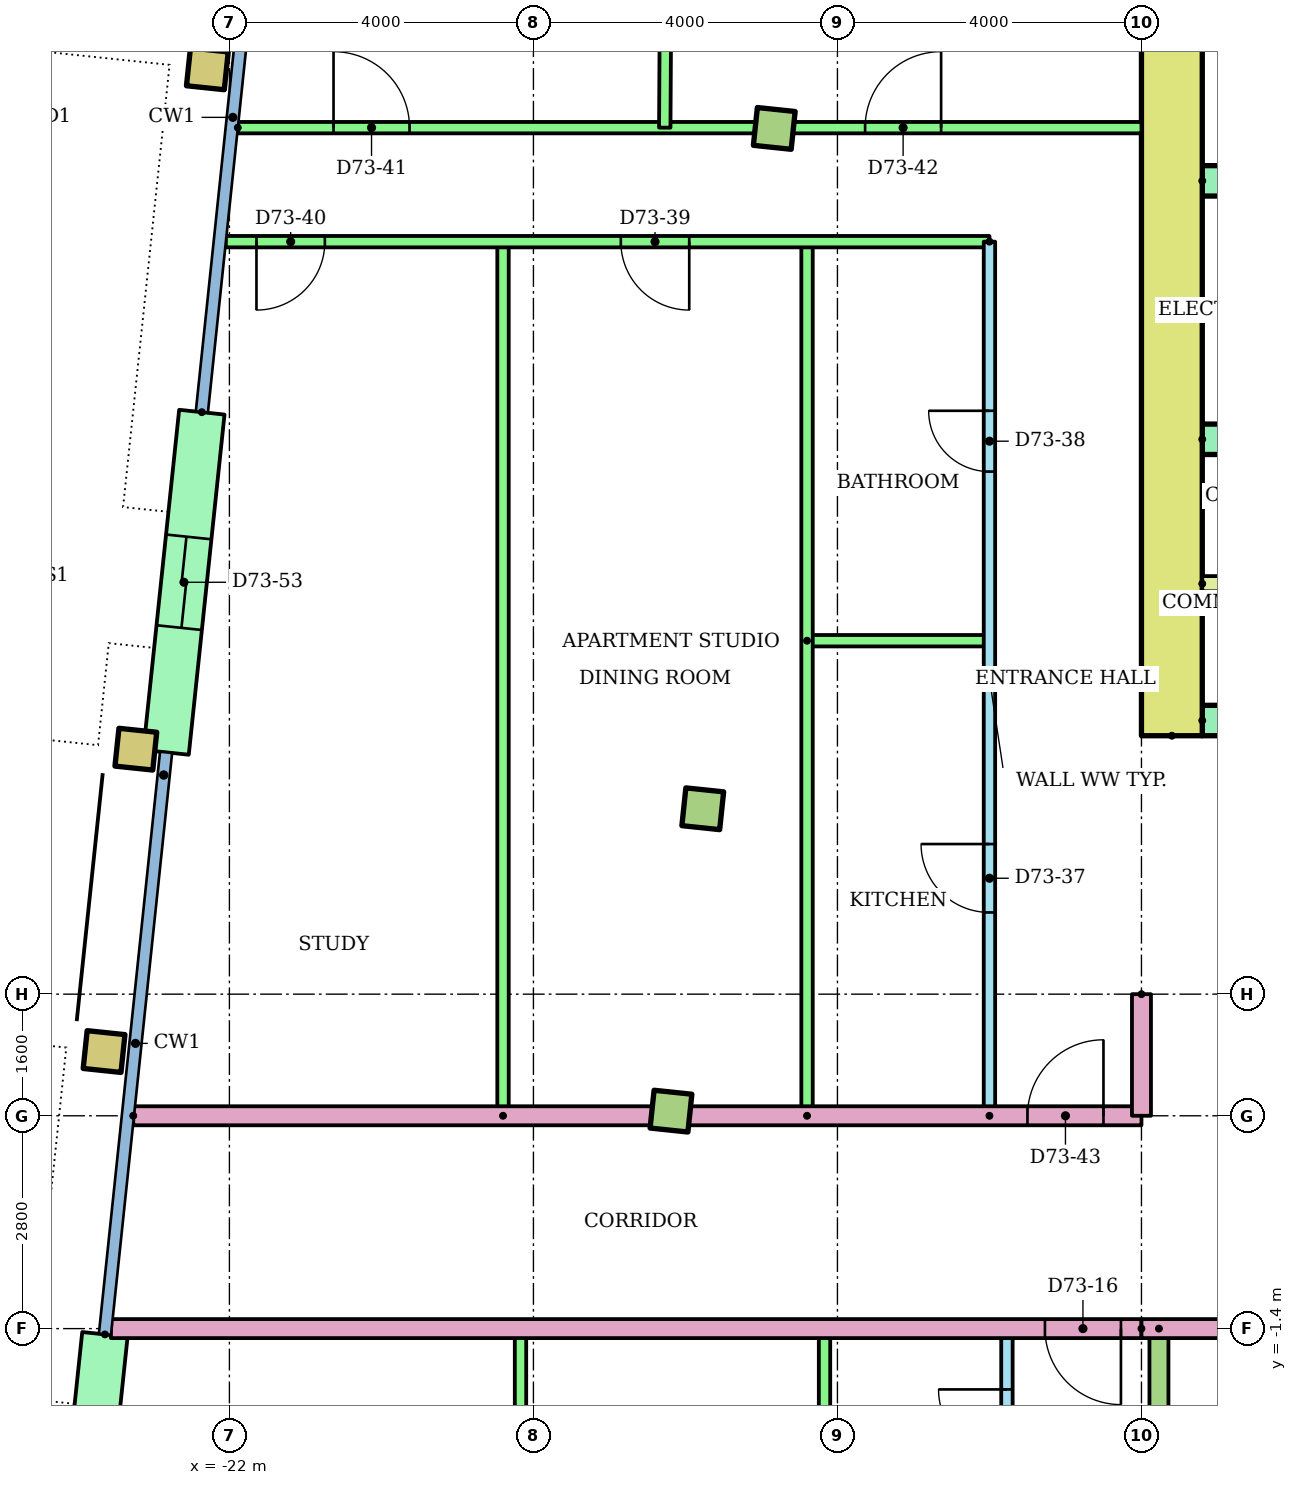
"""IFC4 building model, lengths in metres.
Left out: names, types, materials, properties, quantities, classifications, styles, units other than length and angle.
Written with IfcOpenShell. Run it as: python <this file> out.ifc"""

import sys

from ifc_helpers import new_model, si_unit, direction, frame, frame_2d, origin, origin_2d, place, context, subcontext, project, spatial, rectangle, hollow_rectangle, extrude, element, fill, save


model = new_model("IFC4")
c1 = context("Model", 3, precision=1e-05, world=origin(), true_north=direction((0.0, 1.0)))
c2 = subcontext(c1, "Body", "Model", "MODEL_VIEW")
j1 = project(units=[si_unit("LENGTHUNIT", "METRE"), si_unit("PLANEANGLEUNIT", "RADIAN")], contexts=[c1])
p1 = place(None, origin())
s1 = spatial("IfcSite", under=j1, at=p1, CompositionType="ELEMENT")
p2 = place(p1, origin())
s2 = spatial("IfcBuilding", under=s1, at=p2, CompositionType="ELEMENT")
p3 = place(p2, frame((0.0, 0.0, 278.7)))
s3 = spatial("IfcBuildingStorey", under=s2, at=p3, CompositionType="ELEMENT", Elevation=278.7)
p4 = place(p3, frame((-23.649, 2.245, 0.0), z_axis=(0.0, 0.0, 1.0), x_axis=(0.994521895368, -0.104528463268, 0.0)))
e1 = element("IfcColumn", 1, at=p4, inside=s3, PredefinedType="COLUMN", context=c2, shape_type="SweptSolid", body=[
    extrude(hollow_rectangle(XDim=0.5, YDim=0.5, WallThickness=0.025, at=origin_2d()), origin(), (0.0, 0.0, 1.0), 3.2),
])
p5 = place(p3, frame((-16.19, 1.461, 0.0), z_axis=(0.0, 0.0, 1.0), x_axis=(0.994521895368, -0.104528463268, 0.0)))
e2 = element("IfcColumn", 2, at=p5, inside=s3, PredefinedType="COLUMN", context=c2, shape_type="SweptSolid", body=[
    extrude(rectangle(XDim=0.5, YDim=0.5, at=origin_2d()), origin(), (0.0, 0.0, 1.0), 3.2),
])
p6 = place(p3, frame((-23.231, 6.223, 0.0), z_axis=(0.0, 0.0, 1.0), x_axis=(0.994521895368, -0.104528463268, 0.0)))
e3 = element("IfcColumn", 3, at=p6, inside=s3, PredefinedType="COLUMN", context=c2, shape_type="SweptSolid", body=[
    extrude(hollow_rectangle(XDim=0.5, YDim=0.5, WallThickness=0.025, at=origin_2d()), origin(), (0.0, 0.0, 1.0), 3.2),
])
p7 = place(p3, frame((-15.772, 5.439, 0.0), z_axis=(0.0, 0.0, 1.0), x_axis=(0.994521895368, -0.104528463268, 0.0)))
e4 = element("IfcColumn", 4, at=p7, inside=s3, PredefinedType="COLUMN", context=c2, shape_type="SweptSolid", body=[
    extrude(rectangle(XDim=0.5, YDim=0.5, at=origin_2d()), origin(), (0.0, 0.0, 1.0), 3.2),
])
p8 = place(p3, frame((-22.29, 15.174, 0.0), z_axis=(0.0, 0.0, 1.0), x_axis=(0.994521895368, -0.104528463268, 0.0)))
e5 = element("IfcColumn", 5, at=p8, inside=s3, PredefinedType="COLUMN", context=c2, shape_type="SweptSolid", body=[
    extrude(hollow_rectangle(XDim=0.5, YDim=0.5, WallThickness=0.025, at=origin_2d()), origin(), (0.0, 0.0, 1.0), 3.2),
])
p9 = place(p3, frame((-14.831, 14.39, 0.0), z_axis=(0.0, 0.0, 1.0), x_axis=(0.994521895368, -0.104528463268, 0.0)))
e6 = element("IfcColumn", 6, at=p9, inside=s3, PredefinedType="COLUMN", context=c2, shape_type="SweptSolid", body=[
    extrude(rectangle(XDim=0.5, YDim=0.5, at=origin_2d()), origin(), (0.0, 0.0, 1.0), 3.2),
])
p10 = place(p3, frame((-22.363, 10.657, 0.0), z_axis=(0.0, 0.0, 1.0), x_axis=(-0.104492739125, -0.994525649478, 0.0)))
e7 = element("IfcWall", 7, at=p10, inside=s3, PredefinedType="STANDARD", context=c2, shape_type="SweptSolid", body=[
    extrude(rectangle(XDim=4.5, YDim=0.6, at=frame_2d((2.25, 0.0))), origin(), (0.0, 0.0, 1.0), 2.8),
])
p11 = place(p10, frame((1.65, 0.0, 0.0)))
e8 = element("IfcOpeningElement", 8, at=p11, cuts=e7, PredefinedType="OPENING", context=c2, shape_type="SweptSolid", body=[
    extrude(rectangle(XDim=1.2, YDim=2.1, at=frame_2d((0.6, 1.05))), frame((0.0, 0.31, 0.0), z_axis=(0.0, -1.0, 0.0), x_axis=(1.0, 0.0, 0.0)), (0.0, 0.0, 1.0), 0.62),
])
p12 = place(p3, frame((-23.638, -1.476, 0.0), z_axis=(0.0, 0.0, 1.0), x_axis=(-0.104513052986, -0.994523514933, 0.0)))
e9 = element("IfcWall", 9, at=p12, inside=s3, PredefinedType="STANDARD", context=c2, shape_type="SweptSolid", body=[
    extrude(rectangle(XDim=3.7, YDim=0.6, at=frame_2d((1.85, 0.0))), origin(), (0.0, 0.0, 1.0), 2.8),
])
p13 = place(p12, frame((1.25, 0.0, 0.0)))
e10 = element("IfcOpeningElement", 10, at=p13, cuts=e9, PredefinedType="OPENING", context=c2, shape_type="SweptSolid", body=[
    extrude(rectangle(XDim=1.2, YDim=2.1, at=frame_2d((0.6, 1.05))), frame((0.0, 0.31, 0.0), z_axis=(0.0, -1.0, 0.0), x_axis=(1.0, 0.0, 0.0)), (0.0, 0.0, 1.0), 0.62),
])
p14 = place(p3, frame((-9.6, 6.4, 0.0), z_axis=(0.0, 0.0, 1.0), x_axis=(0.0, 1.0, 0.0)))
e11 = element("IfcWall", 11, at=p14, inside=s3, PredefinedType="SHEAR", context=c2, shape_type="SweptSolid", body=[
    extrude(rectangle(XDim=13.6, YDim=0.8, at=frame_2d((6.8, 0.0))), origin(), (0.0, 0.0, 1.0), 2.8),
])
p15 = place(p3, frame((-9.2, 6.6, 0.0)))
e12 = element("IfcWall", 12, at=p15, inside=s3, PredefinedType="SHEAR", context=c2, shape_type="SweptSolid", body=[
    extrude(rectangle(XDim=18.4, YDim=0.4, at=frame_2d((9.2, 0.0))), origin(), (0.0, 0.0, 1.0), 2.8),
])
p16 = place(p15, frame((8.3, 0.0, 0.0)))
e13 = element("IfcOpeningElement", 13, at=p16, cuts=e12, PredefinedType="OPENING", context=c2, shape_type="SweptSolid", body=[
    extrude(rectangle(XDim=1.8, YDim=2.1, at=frame_2d((0.9, 1.05))), frame((0.0, 0.21, 0.0), z_axis=(0.0, -1.0, 0.0), x_axis=(1.0, 0.0, 0.0)), (0.0, 0.0, 1.0), 0.42),
])
p17 = place(p15, frame((3.8, 0.0, 0.0)))
e14 = element("IfcOpeningElement", 14, at=p17, cuts=e12, PredefinedType="OPENING", context=c2, shape_type="SweptSolid", body=[
    extrude(rectangle(XDim=1.8, YDim=2.1, at=frame_2d((0.9, 1.05))), frame((0.0, 0.21, 0.0), z_axis=(0.0, -1.0, 0.0), x_axis=(1.0, 0.0, 0.0)), (0.0, 0.0, 1.0), 0.42),
])
p18 = place(p15, frame((12.8, 0.0, 0.0)))
e15 = element("IfcOpeningElement", 15, at=p18, cuts=e12, PredefinedType="OPENING", context=c2, shape_type="SweptSolid", body=[
    extrude(rectangle(XDim=1.8, YDim=2.1, at=frame_2d((0.9, 1.05))), frame((0.0, 0.21, 0.0), z_axis=(0.0, -1.0, 0.0), x_axis=(1.0, 0.0, 0.0)), (0.0, 0.0, 1.0), 0.42),
])
p19 = place(p3, frame((-9.2, 10.3, 0.0)))
e16 = element("IfcWall", 16, at=p19, inside=s3, PredefinedType="SHEAR", context=c2, shape_type="SweptSolid", body=[
    extrude(rectangle(XDim=8.0, YDim=0.4, at=frame_2d((4.0, 0.0))), origin(), (0.0, 0.0, 1.0), 2.8),
])
p20 = place(p19, frame((3.35, 0.0, 0.0)))
e17 = element("IfcOpeningElement", 17, at=p20, cuts=e16, PredefinedType="OPENING", context=c2, shape_type="SweptSolid", body=[
    extrude(rectangle(XDim=1.1, YDim=2.1, at=frame_2d((0.55, 1.05))), frame((0.0, 0.21, 0.0), z_axis=(0.0, -1.0, 0.0), x_axis=(1.0, 0.0, 0.0)), (0.0, 0.0, 1.0), 0.42),
])
p21 = place(p19, frame((6.083, 0.0, 0.0)))
e18 = element("IfcOpeningElement", 18, at=p21, cuts=e16, PredefinedType="OPENING", context=c2, shape_type="SweptSolid", body=[
    extrude(rectangle(XDim=1.1, YDim=2.1, at=frame_2d((0.55, 1.05))), frame((0.0, 0.21, 0.0), z_axis=(0.0, -1.0, 0.0), x_axis=(1.0, 0.0, 0.0)), (0.0, 0.0, 1.0), 0.42),
])
p22 = place(p19, frame((0.917, 0.0, 0.0)))
e19 = element("IfcOpeningElement", 19, at=p22, cuts=e16, PredefinedType="OPENING", context=c2, shape_type="SweptSolid", body=[
    extrude(rectangle(XDim=1.0, YDim=2.1, at=frame_2d((0.5, 1.05))), frame((0.0, 0.21, 0.0), z_axis=(0.0, -1.0, 0.0), x_axis=(1.0, 0.0, 0.0)), (0.0, 0.0, 1.0), 0.42),
])
p23 = place(p3, frame((-9.2, 13.7, 0.0)))
e20 = element("IfcWall", 20, at=p23, inside=s3, PredefinedType="SHEAR", context=c2, shape_type="SweptSolid", body=[
    extrude(rectangle(XDim=8.0, YDim=0.4, at=frame_2d((4.0, 0.0))), origin(), (0.0, 0.0, 1.0), 2.8),
])
p24 = place(p3, frame((-9.2, 8.4, 0.0)))
e21 = element("IfcWall", 21, at=p24, inside=s3, PredefinedType="PARTITIONING", context=c2, shape_type="SweptSolid", body=[
    extrude(rectangle(XDim=3.4, YDim=0.2, at=frame_2d((1.7, 0.0))), origin(), (0.0, 0.0, 1.0), 2.8),
])
p25 = place(p3, frame((-11.77, -5.9, 0.0), z_axis=(0.0, 0.0, 1.0), x_axis=(0.0, 1.0, 0.0)))
e22 = element("IfcWall", 22, at=p25, inside=s3, PredefinedType="PARTITIONING", context=c2, shape_type="SweptSolid", body=[
    extrude(rectangle(XDim=4.5, YDim=0.15, at=frame_2d((2.25, 0.0))), origin(), (0.0, 0.0, 1.0), 2.4),
])
p26 = place(p25, frame((2.8, 0.0, 0.0)))
e23 = element("IfcOpeningElement", 23, at=p26, cuts=e22, PredefinedType="OPENING", context=c2, shape_type="SweptSolid", body=[
    extrude(rectangle(XDim=0.9, YDim=2.1, at=frame_2d((0.45, 1.05))), frame((0.0, 0.085, 0.0), z_axis=(0.0, -1.0, 0.0), x_axis=(1.0, 0.0, 0.0)), (0.0, 0.0, 1.0), 0.17),
])
p27 = place(p25, frame((0.6, 0.0, 0.0)))
e24 = element("IfcOpeningElement", 24, at=p27, cuts=e22, PredefinedType="OPENING", context=c2, shape_type="SweptSolid", body=[
    extrude(rectangle(XDim=0.8, YDim=2.1, at=frame_2d((0.4, 1.05))), frame((0.0, 0.085, 0.0), z_axis=(0.0, -1.0, 0.0), x_axis=(1.0, 0.0, 0.0)), (0.0, 0.0, 1.0), 0.17),
])
for number, where, z_axis, x_axis in (
    (25, (-14.17, -5.9, 0.0), (0.0, 0.0, 1.0), (0.0, 1.0, 0.0)),
    (26, (-18.17, -5.9, 0.0), (0.0, 0.0, 1.0), (0.0, 1.0, 0.0)),
):
    element("IfcWall", number, at=place(p3, frame(where, z_axis=z_axis, x_axis=x_axis)), inside=s3, PredefinedType="PARTITIONING", context=c2, shape_type="SweptSolid", body=[
        extrude(rectangle(XDim=4.5, YDim=0.15, at=frame_2d((2.25, 0.0))), origin(), (0.0, 0.0, 1.0), 2.4),
    ])
p28 = place(p3, frame((-9.77, -1.4, 0.0), z_axis=(0.0, 0.0, 1.0), x_axis=(0.0, -1.0, 0.0)))
e27 = element("IfcWall", 27, at=p28, inside=s3, PredefinedType="PARTITIONING", context=c2, shape_type="SweptSolid", body=[
    extrude(rectangle(XDim=12.504, YDim=0.25, at=frame_2d((6.252, 0.0))), origin(), (0.0, 0.0, 1.0), 2.4),
])
p29 = place(p3, frame((-10.0, -1.4, 0.0), z_axis=(0.0, 0.0, 1.0), x_axis=(-1.0, 0.0, 0.0)))
e28 = element("IfcWall", 28, at=p29, inside=s3, PredefinedType="PARTITIONING", context=c2, shape_type="SweptSolid", body=[
    extrude(rectangle(XDim=13.56, YDim=0.25, at=frame_2d((6.78, 0.0))), origin(), (0.0, 0.0, 1.0), 2.4),
])
p30 = place(p29, frame((0.27, 0.0, 0.0)))
e29 = element("IfcOpeningElement", 29, at=p30, cuts=e28, PredefinedType="OPENING", context=c2, shape_type="SweptSolid", body=[
    extrude(rectangle(XDim=1.0, YDim=2.1, at=frame_2d((0.5, 1.05))), frame((0.0, 0.135, 0.0), z_axis=(0.0, -1.0, 0.0), x_axis=(1.0, 0.0, 0.0)), (0.0, 0.0, 1.0), 0.27),
])
p31 = place(p3, frame((-12.0, 1.4, 0.0), z_axis=(0.0, 0.0, 1.0), x_axis=(0.0, 1.0, 0.0)))
e30 = element("IfcWall", 30, at=p31, inside=s3, PredefinedType="PARTITIONING", context=c2, shape_type="SweptSolid", body=[
    extrude(rectangle(XDim=11.5, YDim=0.15, at=frame_2d((5.75, 0.0))), origin(), (0.0, 0.0, 1.0), 2.4),
])
p32 = place(p31, frame((2.675, 0.0, 0.0)))
e31 = element("IfcOpeningElement", 31, at=p32, cuts=e30, PredefinedType="OPENING", context=c2, shape_type="SweptSolid", body=[
    extrude(rectangle(XDim=0.9, YDim=2.1, at=frame_2d((0.45, 1.05))), frame((0.0, 0.085, 0.0), z_axis=(0.0, -1.0, 0.0), x_axis=(1.0, 0.0, 0.0)), (0.0, 0.0, 1.0), 0.17),
])
p33 = place(p31, frame((8.475, 0.0, 0.0)))
e32 = element("IfcOpeningElement", 32, at=p33, cuts=e30, PredefinedType="OPENING", context=c2, shape_type="SweptSolid", body=[
    extrude(rectangle(XDim=0.8, YDim=2.1, at=frame_2d((0.4, 1.05))), frame((0.0, 0.085, 0.0), z_axis=(0.0, -1.0, 0.0), x_axis=(1.0, 0.0, 0.0)), (0.0, 0.0, 1.0), 0.17),
])
p34 = place(p3, frame((-14.4, 7.65, 0.0)))
e33 = element("IfcWall", 33, at=p34, inside=s3, PredefinedType="PARTITIONING", context=c2, shape_type="SweptSolid", body=[
    extrude(rectangle(XDim=2.4, YDim=0.15, at=frame_2d((1.2, 0.0))), origin(), (0.0, 0.0, 1.0), 2.4),
])
for number, where, z_axis, x_axis in (
    (34, (-14.4, 1.4, 0.0), (0.0, 0.0, 1.0), (0.0, 1.0, 0.0)),
    (35, (-18.4, 1.4, 0.0), (0.0, 0.0, 1.0), (0.0, 1.0, 0.0)),
):
    element("IfcWall", number, at=place(p3, frame(where, z_axis=z_axis, x_axis=x_axis)), inside=s3, PredefinedType="PARTITIONING", context=c2, shape_type="SweptSolid", body=[
        extrude(rectangle(XDim=11.5, YDim=0.15, at=frame_2d((5.75, 0.0))), origin(), (0.0, 0.0, 1.0), 2.4),
    ])
p35 = place(p3, frame((-12.0, 12.9, 0.0), z_axis=(0.0, 0.0, 1.0), x_axis=(-1.0, 0.0, 0.0)))
e36 = element("IfcWall", 36, at=p35, inside=s3, PredefinedType="PARTITIONING", context=c2, shape_type="SweptSolid", body=[
    extrude(rectangle(XDim=10.047, YDim=0.15, at=frame_2d((5.024, 0.0))), origin(), (0.0, 0.0, 1.0), 2.4),
])
p36 = place(p35, frame((3.95, 0.0, 0.0)))
e37 = element("IfcOpeningElement", 37, at=p36, cuts=e36, PredefinedType="OPENING", context=c2, shape_type="SweptSolid", body=[
    extrude(rectangle(XDim=0.9, YDim=2.1, at=frame_2d((0.45, 1.05))), frame((0.0, 0.085, 0.0), z_axis=(0.0, -1.0, 0.0), x_axis=(1.0, 0.0, 0.0)), (0.0, 0.0, 1.0), 0.17),
])
p37 = place(p35, frame((8.744, 0.0, 0.0)))
e38 = element("IfcOpeningElement", 38, at=p37, cuts=e36, PredefinedType="OPENING", context=c2, shape_type="SweptSolid", body=[
    extrude(rectangle(XDim=0.9, YDim=2.1, at=frame_2d((0.45, 1.05))), frame((0.0, 0.085, 0.0), z_axis=(0.0, -1.0, 0.0), x_axis=(1.0, 0.0, 0.0)), (0.0, 0.0, 1.0), 0.17),
])
p38 = place(p3, frame((-21.89, 14.4, 0.0)))
e39 = element("IfcWall", 39, at=p38, inside=s3, PredefinedType="PARTITIONING", context=c2, shape_type="SweptSolid", body=[
    extrude(rectangle(XDim=11.89, YDim=0.15, at=frame_2d((5.945, 0.0))), origin(), (0.0, 0.0, 1.0), 2.4),
])
p39 = place(p38, frame((1.26, 0.0, 0.0)))
e40 = element("IfcOpeningElement", 40, at=p39, cuts=e39, PredefinedType="OPENING", context=c2, shape_type="SweptSolid", body=[
    extrude(rectangle(XDim=1.0, YDim=2.1, at=frame_2d((0.5, 1.05))), frame((0.0, 0.085, 0.0), z_axis=(0.0, -1.0, 0.0), x_axis=(1.0, 0.0, 0.0)), (0.0, 0.0, 1.0), 0.17),
])
p40 = place(p38, frame((8.254, 0.0, 0.0)))
e41 = element("IfcOpeningElement", 41, at=p40, cuts=e39, PredefinedType="OPENING", context=c2, shape_type="SweptSolid", body=[
    extrude(rectangle(XDim=1.0, YDim=2.1, at=frame_2d((0.5, 1.05))), frame((0.0, 0.085, 0.0), z_axis=(0.0, -1.0, 0.0), x_axis=(1.0, 0.0, 0.0)), (0.0, 0.0, 1.0), 0.17),
])
p41 = place(p3, frame((-16.222, 22.61, 0.0), z_axis=(0.0, 0.0, 1.0), x_axis=(-0.006095634594, -0.999981421447, 0.0)))
e42 = element("IfcWall", 42, at=p41, inside=s3, PredefinedType="PARTITIONING", context=c2, shape_type="SweptSolid", body=[
    extrude(rectangle(XDim=8.211, YDim=0.15, at=frame_2d((4.105, 0.0))), origin(), (0.0, 0.0, 1.0), 2.4),
])
p42 = place(p3, frame((-23.265, 1.4, 0.0)))
e43 = element("IfcWall", 43, at=p42, inside=s3, PredefinedType="PARTITIONING", context=c2, shape_type="SweptSolid", body=[
    extrude(rectangle(XDim=13.265, YDim=0.25, at=frame_2d((6.633, 0.0))), origin(), (0.0, 0.0, 1.0), 2.4),
])
p43 = place(p42, frame((11.765, 0.0, 0.0)))
e44 = element("IfcOpeningElement", 44, at=p43, cuts=e43, PredefinedType="OPENING", context=c2, shape_type="SweptSolid", body=[
    extrude(rectangle(XDim=1.0, YDim=2.1, at=frame_2d((0.5, 1.05))), frame((0.0, 0.135, 0.0), z_axis=(0.0, -1.0, 0.0), x_axis=(1.0, 0.0, 0.0)), (0.0, 0.0, 1.0), 0.27),
])
p44 = place(p3, frame((10.0, -1.4, 0.0), z_axis=(0.0, 0.0, 1.0), x_axis=(-1.0, 0.0, 0.0)))
e45 = element("IfcWall", 45, at=p44, inside=s3, PredefinedType="PARTITIONING", context=c2, shape_type="SweptSolid", body=[
    extrude(rectangle(XDim=20.0, YDim=0.25, at=frame_2d((10.0, 0.0))), origin(), (0.0, 0.0, 1.0), 2.4),
])
p45 = place(p44, frame((4.358, 0.0, 0.0)))
e46 = element("IfcOpeningElement", 46, at=p45, cuts=e45, PredefinedType="OPENING", context=c2, shape_type="SweptSolid", body=[
    extrude(rectangle(XDim=1.0, YDim=2.1, at=frame_2d((0.5, 1.05))), frame((0.0, 0.135, 0.0), z_axis=(0.0, -1.0, 0.0), x_axis=(1.0, 0.0, 0.0)), (0.0, 0.0, 1.0), 0.27),
])
p46 = place(p44, frame((2.614, 0.0, 0.0)))
e47 = element("IfcOpeningElement", 47, at=p46, cuts=e45, PredefinedType="OPENING", context=c2, shape_type="SweptSolid", body=[
    extrude(rectangle(XDim=0.9, YDim=2.1, at=frame_2d((0.45, 1.05))), frame((0.0, 0.135, 0.0), z_axis=(0.0, -1.0, 0.0), x_axis=(1.0, 0.0, 0.0)), (0.0, 0.0, 1.0), 0.27),
])
p47 = place(p3, frame((-10.0, 3.0, 0.0), z_axis=(0.0, 0.0, 1.0), x_axis=(0.0, -1.0, 0.0)))
e48 = element("IfcWall", 48, at=p47, inside=s3, PredefinedType="PARTITIONING", context=c2, shape_type="SweptSolid", body=[
    extrude(rectangle(XDim=1.6, YDim=0.25, at=frame_2d((0.8, 0.0))), origin(), (0.0, 0.0, 1.0), 2.4),
])
p48 = place(p26, origin())
e49 = element("IfcDoor", 49, at=p48, inside=s3, OperationType="SINGLE_SWING_RIGHT", PredefinedType="DOOR", context=c2, shape_type="SweptSolid", body=[
    extrude(rectangle(XDim=0.9, YDim=2.1, at=frame_2d((0.45, 1.05))), frame((0.0, 0.025, 0.0), z_axis=(0.0, -1.0, 0.0), x_axis=(1.0, 0.0, 0.0)), (0.0, 0.0, 1.0), 0.05),
])
fill(e23, e49)
p49 = place(p30, origin())
e50 = element("IfcDoor", 50, at=p49, inside=s3, OperationType="SINGLE_SWING_LEFT", PredefinedType="DOOR", context=c2, shape_type="SweptSolid", body=[
    extrude(rectangle(XDim=1.0, YDim=2.1, at=frame_2d((0.5, 1.05))), frame((0.0, 0.025, 0.0), z_axis=(0.0, -1.0, 0.0), x_axis=(1.0, 0.0, 0.0)), (0.0, 0.0, 1.0), 0.05),
])
fill(e29, e50)
p50 = place(p32, origin())
e51 = element("IfcDoor", 51, at=p50, inside=s3, OperationType="SINGLE_SWING_RIGHT", PredefinedType="DOOR", context=c2, shape_type="SweptSolid", body=[
    extrude(rectangle(XDim=0.9, YDim=2.1, at=frame_2d((0.45, 1.05))), frame((0.0, 0.025, 0.0), z_axis=(0.0, -1.0, 0.0), x_axis=(1.0, 0.0, 0.0)), (0.0, 0.0, 1.0), 0.05),
])
fill(e31, e51)
p51 = place(p33, origin())
e52 = element("IfcDoor", 52, at=p51, inside=s3, OperationType="SINGLE_SWING_RIGHT", PredefinedType="DOOR", context=c2, shape_type="SweptSolid", body=[
    extrude(rectangle(XDim=0.8, YDim=2.1, at=frame_2d((0.4, 1.05))), frame((0.0, 0.025, 0.0), z_axis=(0.0, -1.0, 0.0), x_axis=(1.0, 0.0, 0.0)), (0.0, 0.0, 1.0), 0.05),
])
fill(e32, e52)
p52 = place(p36, origin())
e53 = element("IfcDoor", 53, at=p52, inside=s3, OperationType="SINGLE_SWING_LEFT", PredefinedType="DOOR", context=c2, shape_type="SweptSolid", body=[
    extrude(rectangle(XDim=0.9, YDim=2.1, at=frame_2d((0.45, 1.05))), frame((0.0, 0.025, 0.0), z_axis=(0.0, -1.0, 0.0), x_axis=(1.0, 0.0, 0.0)), (0.0, 0.0, 1.0), 0.05),
])
fill(e37, e53)
p53 = place(p37, origin())
e54 = element("IfcDoor", 54, at=p53, inside=s3, OperationType="SINGLE_SWING_RIGHT", PredefinedType="DOOR", context=c2, shape_type="SweptSolid", body=[
    extrude(rectangle(XDim=0.9, YDim=2.1, at=frame_2d((0.45, 1.05))), frame((0.0, 0.025, 0.0), z_axis=(0.0, -1.0, 0.0), x_axis=(1.0, 0.0, 0.0)), (0.0, 0.0, 1.0), 0.05),
])
fill(e38, e54)
p54 = place(p39, origin())
e55 = element("IfcDoor", 55, at=p54, inside=s3, OperationType="SINGLE_SWING_LEFT", PredefinedType="DOOR", context=c2, shape_type="SweptSolid", body=[
    extrude(rectangle(XDim=1.0, YDim=2.1, at=frame_2d((0.5, 1.05))), frame((0.0, 0.025, 0.0), z_axis=(0.0, -1.0, 0.0), x_axis=(1.0, 0.0, 0.0)), (0.0, 0.0, 1.0), 0.05),
])
fill(e40, e55)
p55 = place(p40, origin())
e56 = element("IfcDoor", 56, at=p55, inside=s3, OperationType="SINGLE_SWING_RIGHT", PredefinedType="DOOR", context=c2, shape_type="SweptSolid", body=[
    extrude(rectangle(XDim=1.0, YDim=2.1, at=frame_2d((0.5, 1.05))), frame((0.0, 0.025, 0.0), z_axis=(0.0, -1.0, 0.0), x_axis=(1.0, 0.0, 0.0)), (0.0, 0.0, 1.0), 0.05),
])
fill(e41, e56)
p56 = place(p43, origin())
e57 = element("IfcDoor", 57, at=p56, inside=s3, OperationType="SINGLE_SWING_RIGHT", PredefinedType="DOOR", context=c2, shape_type="SweptSolid", body=[
    extrude(rectangle(XDim=1.0, YDim=2.1, at=frame_2d((0.5, 1.05))), frame((0.0, 0.025, 0.0), z_axis=(0.0, -1.0, 0.0), x_axis=(1.0, 0.0, 0.0)), (0.0, 0.0, 1.0), 0.05),
])
fill(e44, e57)
p57 = place(p11, origin())
e58 = element("IfcDoor", 58, at=p57, inside=s3, OperationType="SLIDING_TO_LEFT", PredefinedType="DOOR", context=c2, shape_type="SweptSolid", body=[
    extrude(rectangle(XDim=1.2, YDim=2.1, at=frame_2d((0.6, 1.05))), frame((0.0, 0.025, 0.0), z_axis=(0.0, -1.0, 0.0), x_axis=(1.0, 0.0, 0.0)), (0.0, 0.0, 1.0), 0.05),
])
fill(e8, e58)
save(model, sys.argv[1])
